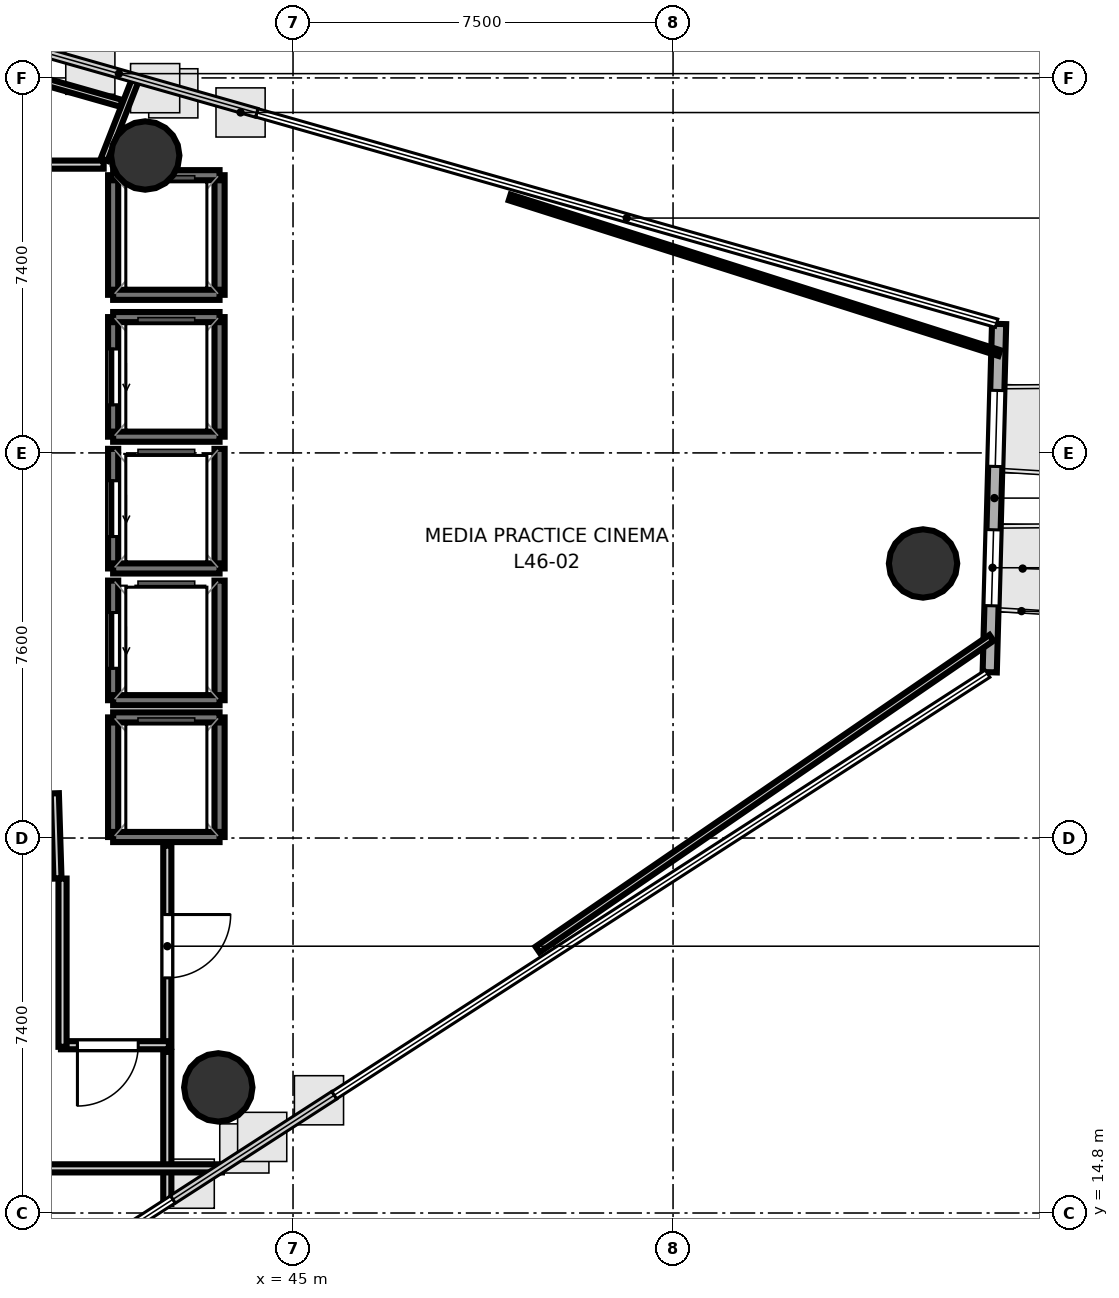
"""IFC4 building model, lengths in metres.
Left out: names, types, materials, properties, quantities, classifications, styles, units other than length and angle.
Written with IfcOpenShell. Run it as: python <this file> out.ifc"""

import sys

from ifc_helpers import new_model, si_unit, direction, frame, frame_2d, origin, origin_2d, place, context, subcontext, project, spatial, rectangle, hollow_circle, extrude, element, fill, save


model = new_model("IFC4")
c1 = context("Model", 3, precision=1e-05, world=origin(), true_north=direction((0.0, 1.0)))
c2 = subcontext(c1, "Body", "Model", "MODEL_VIEW")
j1 = project(units=[si_unit("LENGTHUNIT", "METRE"), si_unit("PLANEANGLEUNIT", "RADIAN")], contexts=[c1])
p1 = place(None, origin())
s1 = spatial("IfcSite", under=j1, at=p1, CompositionType="ELEMENT")
p2 = place(p1, origin())
s2 = spatial("IfcBuilding", under=s1, at=p2, CompositionType="ELEMENT")
p3 = place(p2, frame((0.0, 0.0, 180.9)))
s3 = spatial("IfcBuildingStorey", under=s2, at=p3, CompositionType="ELEMENT", Elevation=180.9)
for number, where, z_axis, x_axis in (
    (1, (57.434, 27.618, 0.0), (0.0, 0.0, 1.0), (1.0, 0.0, 0.0)),
    (2, (42.083, 35.669, 0.0), (0.0, 0.0, 1.0), (1.0, 0.0, 0.0)),
    (3, (43.525, 17.279, 0.0), (0.0, 0.0, 1.0), (1.0, 0.0, 0.0)),
):
    element("IfcColumn", number, at=place(p3, frame(where, z_axis=z_axis, x_axis=x_axis)), inside=s3, PredefinedType="COLUMN", context=c2, shape_type="SweptSolid", body=[
        extrude(hollow_circle(Radius=0.675, WallThickness=0.032, at=origin_2d()), origin(), (0.0, 0.0, 1.0), 3.7),
    ])
p4 = place(p3, frame((58.75, 25.471, 0.0), z_axis=(0.0, 0.0, 1.0), x_axis=(0.026948121349, 0.999636833433, 0.0)))
e4 = element("IfcWall", 4, at=p4, inside=s3, PredefinedType="SOLIDWALL", context=c2, shape_type="SweptSolid", body=[
    extrude(rectangle(XDim=6.876, YDim=0.28, at=frame_2d((3.438, 0.0))), origin(), (0.0, 0.0, 1.0), 3.4),
])
p5 = place(p4, frame((1.313, 0.0, 0.85)))
e5 = element("IfcOpeningElement", 5, at=p5, cuts=e4, PredefinedType="OPENING", context=c2, shape_type="SweptSolid", body=[
    extrude(rectangle(XDim=1.5, YDim=2.1, at=frame_2d((0.75, 1.05))), frame((0.0, 0.15, 0.0), z_axis=(0.0, -1.0, 0.0), x_axis=(1.0, 0.0, 0.0)), (0.0, 0.0, 1.0), 0.3),
])
p6 = place(p4, frame((4.063, 0.0, 0.85)))
e6 = element("IfcOpeningElement", 6, at=p6, cuts=e4, PredefinedType="OPENING", context=c2, shape_type="SweptSolid", body=[
    extrude(rectangle(XDim=1.5, YDim=2.1, at=frame_2d((0.75, 1.05))), frame((0.0, 0.15, 0.0), z_axis=(0.0, -1.0, 0.0), x_axis=(1.0, 0.0, 0.0)), (0.0, 0.0, 1.0), 0.3),
])
p7 = place(p3, frame((43.55, 30.12, 0.0), z_axis=(0.0, 0.0, 1.0), x_axis=(0.0, 1.0, 0.0)))
e7 = element("IfcWall", 7, at=p7, inside=s3, PredefinedType="SOLIDWALL", context=c2, shape_type="SweptSolid", body=[
    extrude(rectangle(XDim=2.36, YDim=0.2, at=frame_2d((1.18, 0.0))), origin(), (0.0, 0.0, 1.0), 3.4),
])
p8 = place(p3, frame((41.45, 30.12, 0.0), z_axis=(0.0, 0.0, 1.0), x_axis=(0.0, 1.0, 0.0)))
e8 = element("IfcWall", 8, at=p8, inside=s3, PredefinedType="SOLIDWALL", context=c2, shape_type="SweptSolid", body=[
    extrude(rectangle(XDim=2.36, YDim=0.2, at=frame_2d((1.18, 0.0))), origin(), (0.0, 0.0, 1.0), 3.4),
])
p9 = place(p8, frame((0.63, 0.0, 0.0)))
e9 = element("IfcOpeningElement", 9, at=p9, cuts=e8, PredefinedType="OPENING", context=c2, shape_type="SweptSolid", body=[
    extrude(rectangle(XDim=1.1, YDim=2.15, at=frame_2d((0.55, 1.075))), frame((0.0, 0.11, 0.0), z_axis=(0.0, -1.0, 0.0), x_axis=(1.0, 0.0, 0.0)), (0.0, 0.0, 1.0), 0.22),
])
for number, where, z_axis, x_axis in (
    (10, (41.45, 32.48, 0.0), (0.0, 0.0, 1.0), (1.0, 0.0, 0.0)),
    (11, (41.45, 30.12, 0.0), (0.0, 0.0, 1.0), (1.0, 0.0, 0.0)),
):
    element("IfcWall", number, at=place(p3, frame(where, z_axis=z_axis, x_axis=x_axis)), inside=s3, PredefinedType="SOLIDWALL", context=c2, shape_type="SweptSolid", body=[
        extrude(rectangle(XDim=2.1, YDim=0.2, at=frame_2d((1.05, 0.0))), origin(), (0.0, 0.0, 1.0), 3.4),
    ])
p10 = place(p3, frame((43.55, 27.52, 0.0), z_axis=(0.0, 0.0, 1.0), x_axis=(0.0, 1.0, 0.0)))
e12 = element("IfcWall", 12, at=p10, inside=s3, PredefinedType="SOLIDWALL", context=c2, shape_type="SweptSolid", body=[
    extrude(rectangle(XDim=2.36, YDim=0.2, at=frame_2d((1.18, 0.0))), origin(), (0.0, 0.0, 1.0), 3.4),
])
p11 = place(p3, frame((41.45, 27.52, 0.0), z_axis=(0.0, 0.0, 1.0), x_axis=(0.0, 1.0, 0.0)))
e13 = element("IfcWall", 13, at=p11, inside=s3, PredefinedType="SOLIDWALL", context=c2, shape_type="SweptSolid", body=[
    extrude(rectangle(XDim=2.36, YDim=0.2, at=frame_2d((1.18, 0.0))), origin(), (0.0, 0.0, 1.0), 3.4),
])
p12 = place(p11, frame((0.63, 0.0, 0.0)))
e14 = element("IfcOpeningElement", 14, at=p12, cuts=e13, PredefinedType="OPENING", context=c2, shape_type="SweptSolid", body=[
    extrude(rectangle(XDim=1.1, YDim=2.15, at=frame_2d((0.55, 1.075))), frame((0.0, 0.11, 0.0), z_axis=(0.0, -1.0, 0.0), x_axis=(1.0, 0.0, 0.0)), (0.0, 0.0, 1.0), 0.22),
])
p13 = place(p3, frame((41.45, 27.52, 0.0), z_axis=(0.0, 0.0, 1.0), x_axis=(1.0, 0.0, 0.0)))
e15 = element("IfcWall", 15, at=p13, inside=s3, PredefinedType="SOLIDWALL", context=c2, shape_type="SweptSolid", body=[
    extrude(rectangle(XDim=2.1, YDim=0.2, at=frame_2d((1.05, 0.0))), origin(), (0.0, 0.0, 1.0), 3.4),
])
p14 = place(p3, frame((43.55, 24.92, 0.0), z_axis=(0.0, 0.0, 1.0), x_axis=(0.0, 1.0, 0.0)))
e16 = element("IfcWall", 16, at=p14, inside=s3, PredefinedType="SOLIDWALL", context=c2, shape_type="SweptSolid", body=[
    extrude(rectangle(XDim=2.36, YDim=0.2, at=frame_2d((1.18, 0.0))), origin(), (0.0, 0.0, 1.0), 3.4),
])
p15 = place(p3, frame((41.45, 24.92, 0.0), z_axis=(0.0, 0.0, 1.0), x_axis=(0.0, 1.0, 0.0)))
e17 = element("IfcWall", 17, at=p15, inside=s3, PredefinedType="SOLIDWALL", context=c2, shape_type="SweptSolid", body=[
    extrude(rectangle(XDim=2.36, YDim=0.2, at=frame_2d((1.18, 0.0))), origin(), (0.0, 0.0, 1.0), 3.4),
])
p16 = place(p15, frame((0.63, 0.0, 0.0)))
e18 = element("IfcOpeningElement", 18, at=p16, cuts=e17, PredefinedType="OPENING", context=c2, shape_type="SweptSolid", body=[
    extrude(rectangle(XDim=1.1, YDim=2.15, at=frame_2d((0.55, 1.075))), frame((0.0, 0.11, 0.0), z_axis=(0.0, -1.0, 0.0), x_axis=(1.0, 0.0, 0.0)), (0.0, 0.0, 1.0), 0.22),
])
p17 = place(p3, frame((41.45, 24.92, 0.0), z_axis=(0.0, 0.0, 1.0), x_axis=(1.0, 0.0, 0.0)))
e19 = element("IfcWall", 19, at=p17, inside=s3, PredefinedType="SOLIDWALL", context=c2, shape_type="SweptSolid", body=[
    extrude(rectangle(XDim=2.1, YDim=0.2, at=frame_2d((1.05, 0.0))), origin(), (0.0, 0.0, 1.0), 3.4),
])
for number, where, z_axis, x_axis in (
    (20, (43.55, 22.22, 0.0), (0.0, 0.0, 1.0), (0.0, 1.0, 0.0)),
    (21, (41.45, 22.22, 0.0), (0.0, 0.0, 1.0), (0.0, 1.0, 0.0)),
):
    element("IfcWall", number, at=place(p3, frame(where, z_axis=z_axis, x_axis=x_axis)), inside=s3, PredefinedType="SOLIDWALL", context=c2, shape_type="SweptSolid", body=[
        extrude(rectangle(XDim=2.36, YDim=0.2, at=frame_2d((1.18, 0.0))), origin(), (0.0, 0.0, 1.0), 3.4),
    ])
for number, where, z_axis, x_axis in (
    (22, (41.45, 24.58, 0.0), (0.0, 0.0, 1.0), (1.0, 0.0, 0.0)),
    (23, (41.45, 22.22, 0.0), (0.0, 0.0, 1.0), (1.0, 0.0, 0.0)),
):
    element("IfcWall", number, at=place(p3, frame(where, z_axis=z_axis, x_axis=x_axis)), inside=s3, PredefinedType="SOLIDWALL", context=c2, shape_type="SweptSolid", body=[
        extrude(rectangle(XDim=2.1, YDim=0.2, at=frame_2d((1.05, 0.0))), origin(), (0.0, 0.0, 1.0), 3.4),
    ])
for number, where, z_axis, x_axis in (
    (24, (43.55, 32.92, 0.0), (0.0, 0.0, 1.0), (0.0, 1.0, 0.0)),
    (25, (41.45, 32.92, 0.0), (0.0, 0.0, 1.0), (0.0, 1.0, 0.0)),
):
    element("IfcWall", number, at=place(p3, frame(where, z_axis=z_axis, x_axis=x_axis)), inside=s3, PredefinedType="SOLIDWALL", context=c2, shape_type="SweptSolid", body=[
        extrude(rectangle(XDim=2.36, YDim=0.2, at=frame_2d((1.18, 0.0))), origin(), (0.0, 0.0, 1.0), 3.4),
    ])
for number, where, z_axis, x_axis in (
    (26, (41.45, 35.28, 0.0), (0.0, 0.0, 1.0), (1.0, 0.0, 0.0)),
    (27, (41.45, 32.92, 0.0), (0.0, 0.0, 1.0), (1.0, 0.0, 0.0)),
):
    element("IfcWall", number, at=place(p3, frame(where, z_axis=z_axis, x_axis=x_axis)), inside=s3, PredefinedType="SOLIDWALL", context=c2, shape_type="SweptSolid", body=[
        extrude(rectangle(XDim=2.1, YDim=0.2, at=frame_2d((1.05, 0.0))), origin(), (0.0, 0.0, 1.0), 3.4),
    ])
p18 = place(p3, frame((40.351, 21.401, 0.0), z_axis=(0.0, 0.0, 1.0), x_axis=(-0.031058045979, 0.999517582527, 0.0)))
e28 = element("IfcWall", 28, at=p18, inside=s3, PredefinedType="PARTITIONING", context=c2, shape_type="SweptSolid", body=[
    extrude(rectangle(XDim=1.682, YDim=0.16, at=frame_2d((0.841, 0.0))), origin(), (0.0, 0.0, 1.0), 2.72),
])
p19 = place(p3, frame((39.88, 35.489, 0.0), z_axis=(0.0, 0.0, 1.0), x_axis=(1.0, 0.0, 0.0)))
e29 = element("IfcWall", 29, at=p19, inside=s3, PredefinedType="PARTITIONING", context=c2, shape_type="SweptSolid", body=[
    extrude(rectangle(XDim=1.383, YDim=0.16, at=frame_2d((0.691, 0.0))), origin(), (0.0, 0.0, 1.0), 2.72),
])
p20 = place(p3, frame((42.519, 22.05, 0.0), z_axis=(0.0, 0.0, 1.0), x_axis=(0.0, -1.0, 0.0)))
e30 = element("IfcWall", 30, at=p20, inside=s3, PredefinedType="PARTITIONING", context=c2, shape_type="SweptSolid", body=[
    extrude(rectangle(XDim=3.97, YDim=0.16, at=frame_2d((1.985, 0.0))), origin(), (0.0, 0.0, 1.0), 2.72),
])
p21 = place(p20, frame((1.36, 0.0, 0.0)))
e31 = element("IfcOpeningElement", 31, at=p21, cuts=e30, PredefinedType="OPENING", context=c2, shape_type="SweptSolid", body=[
    extrude(rectangle(XDim=1.25, YDim=2.2, at=frame_2d((0.625, 1.1))), frame((0.0, 0.09, 0.0), z_axis=(0.0, -1.0, 0.0), x_axis=(1.0, 0.0, 0.0)), (0.0, 0.0, 1.0), 0.18),
])
p22 = place(p3, frame((42.55, 18.111, 0.0), z_axis=(0.0, 0.0, 1.0), x_axis=(-1.0, 0.0, 0.0)))
e32 = element("IfcWall", 32, at=p22, inside=s3, PredefinedType="PARTITIONING", context=c2, shape_type="SweptSolid", body=[
    extrude(rectangle(XDim=2.13, YDim=0.16, at=frame_2d((1.065, 0.0))), origin(), (0.0, 0.0, 1.0), 2.72),
])
p23 = place(p22, frame((0.605, 0.0, 0.0)))
e33 = element("IfcOpeningElement", 33, at=p23, cuts=e32, PredefinedType="OPENING", context=c2, shape_type="SweptSolid", body=[
    extrude(rectangle(XDim=1.2, YDim=2.15, at=frame_2d((0.6, 1.075))), frame((0.0, 0.09, 0.0), z_axis=(0.0, -1.0, 0.0), x_axis=(1.0, 0.0, 0.0)), (0.0, 0.0, 1.0), 0.18),
])
p24 = place(p3, frame((40.451, 18.08, 0.0), z_axis=(0.0, 0.0, 1.0), x_axis=(0.0, 1.0, 0.0)))
e34 = element("IfcWall", 34, at=p24, inside=s3, PredefinedType="PARTITIONING", context=c2, shape_type="SweptSolid", body=[
    extrude(rectangle(XDim=3.32, YDim=0.16, at=frame_2d((1.66, 0.0))), origin(), (0.0, 0.0, 1.0), 2.72),
])
p25 = place(p3, frame((42.519, 17.98, 0.0), z_axis=(0.0, 0.0, 1.0), x_axis=(0.0, -1.0, 0.0)))
e35 = element("IfcWall", 35, at=p25, inside=s3, PredefinedType="PARTITIONING", context=c2, shape_type="SweptSolid", body=[
    extrude(rectangle(XDim=3.002, YDim=0.16, at=frame_2d((1.501, 0.0))), origin(), (0.0, 0.0, 1.0), 2.72),
])
p26 = place(p3, frame((43.597, 15.681, 0.0), z_axis=(0.0, 0.0, 1.0), x_axis=(-1.0, 0.0, 0.0)))
e36 = element("IfcWall", 36, at=p26, inside=s3, PredefinedType="PARTITIONING", context=c2, shape_type="SweptSolid", body=[
    extrude(rectangle(XDim=15.197, YDim=0.16, at=frame_2d((7.599, 0.0))), origin(), (0.0, 0.0, 1.0), 2.72),
])
p27 = place(p26, frame((7.179, 0.0, 0.0)))
e37 = element("IfcOpeningElement", 37, at=p27, cuts=e36, PredefinedType="OPENING", context=c2, shape_type="SweptSolid", body=[
    extrude(rectangle(XDim=1.25, YDim=2.2, at=frame_2d((0.625, 1.1))), frame((0.0, 0.09, 0.0), z_axis=(0.0, -1.0, 0.0), x_axis=(1.0, 0.0, 0.0)), (0.0, 0.0, 1.0), 0.18),
])
p28 = place(p3, frame((41.273, 35.589, 0.0), z_axis=(0.0, 0.0, 1.0), x_axis=(0.364552894348, 0.931182681981, 0.0)))
e38 = element("IfcWall", 38, at=p28, inside=s3, PredefinedType="PARTITIONING", context=c2, shape_type="SweptSolid", body=[
    extrude(rectangle(XDim=1.739, YDim=0.14, at=frame_2d((0.869, 0.0))), origin(), (0.0, 0.0, 1.0), 2.72),
])
p29 = place(p3, frame((49.276, 34.842, 0.0), z_axis=(0.0, 0.0, 1.0), x_axis=(0.953025342731, -0.302890567882, 0.0)))
e39 = element("IfcWall", 39, at=p29, inside=s3, PredefinedType="PARTITIONING", context=c2, shape_type="SweptSolid", body=[
    extrude(rectangle(XDim=10.139, YDim=0.12, at=frame_2d((5.07, 0.0))), origin(), (0.0, 0.0, 1.0), 2.72),
])
p30 = place(p3, frame((58.784, 26.15, 0.0), z_axis=(0.0, 0.0, 1.0), x_axis=(-0.824381998841, -0.566033850566, 0.0)))
e40 = element("IfcWall", 40, at=p30, inside=s3, PredefinedType="PARTITIONING", context=c2, shape_type="SweptSolid", body=[
    extrude(rectangle(XDim=10.867, YDim=0.14, at=frame_2d((5.433, 0.0))), origin(), (0.0, 0.0, 1.0), 2.72),
])
p31 = place(p3, frame((37.221, 37.946, 0.0), z_axis=(0.0, 0.0, 1.0), x_axis=(0.961870441874, -0.27350548998, 0.0)))
e41 = element("IfcWall", 41, at=p31, inside=s3, PredefinedType="PARTITIONING", context=c2, shape_type="SweptSolid", body=[
    extrude(rectangle(XDim=4.563, YDim=0.14, at=frame_2d((2.282, 0.0))), origin(), (0.0, 0.0, 1.0), 2.72),
])
p32 = place(p9, origin())
e42 = element("IfcDoor", 42, at=p32, inside=s3, OperationType="SLIDING_TO_LEFT", PredefinedType="DOOR", context=c2, shape_type="SweptSolid", body=[
    extrude(rectangle(XDim=1.1, YDim=2.15, at=frame_2d((0.55, 1.075))), frame((0.0, 0.025, 0.0), z_axis=(0.0, -1.0, 0.0), x_axis=(1.0, 0.0, 0.0)), (0.0, 0.0, 1.0), 0.05),
])
fill(e9, e42)
p33 = place(p12, origin())
e43 = element("IfcDoor", 43, at=p33, inside=s3, OperationType="SLIDING_TO_LEFT", PredefinedType="DOOR", context=c2, shape_type="SweptSolid", body=[
    extrude(rectangle(XDim=1.1, YDim=2.15, at=frame_2d((0.55, 1.075))), frame((0.0, 0.025, 0.0), z_axis=(0.0, -1.0, 0.0), x_axis=(1.0, 0.0, 0.0)), (0.0, 0.0, 1.0), 0.05),
])
fill(e14, e43)
p34 = place(p16, origin())
e44 = element("IfcDoor", 44, at=p34, inside=s3, OperationType="SLIDING_TO_LEFT", PredefinedType="DOOR", context=c2, shape_type="SweptSolid", body=[
    extrude(rectangle(XDim=1.1, YDim=2.15, at=frame_2d((0.55, 1.075))), frame((0.0, 0.025, 0.0), z_axis=(0.0, -1.0, 0.0), x_axis=(1.0, 0.0, 0.0)), (0.0, 0.0, 1.0), 0.05),
])
fill(e18, e44)
p35 = place(p23, origin())
e45 = element("IfcDoor", 45, at=p35, inside=s3, OperationType="SINGLE_SWING_RIGHT", PredefinedType="DOOR", context=c2, shape_type="SweptSolid", body=[
    extrude(rectangle(XDim=1.2, YDim=2.15, at=frame_2d((0.6, 1.075))), frame((0.0, 0.025, 0.0), z_axis=(0.0, -1.0, 0.0), x_axis=(1.0, 0.0, 0.0)), (0.0, 0.0, 1.0), 0.05),
])
fill(e33, e45)
p36 = place(p21, origin())
e46 = element("IfcDoor", 46, at=p36, inside=s3, OperationType="SINGLE_SWING_LEFT", PredefinedType="DOOR", context=c2, shape_type="SweptSolid", body=[
    extrude(rectangle(XDim=1.25, YDim=2.2, at=frame_2d((0.625, 1.1))), frame((0.0, 0.025, 0.0), z_axis=(0.0, -1.0, 0.0), x_axis=(1.0, 0.0, 0.0)), (0.0, 0.0, 1.0), 0.05),
])
fill(e31, e46)
p37 = place(p5, origin())
e47 = element("IfcWindow", 47, at=p37, inside=s3, PartitioningType="SINGLE_PANEL", PredefinedType="WINDOW", context=c2, shape_type="SweptSolid", body=[
    extrude(rectangle(XDim=1.5, YDim=2.1, at=frame_2d((0.75, 1.05))), frame((0.0, 0.03, 0.0), z_axis=(0.0, -1.0, 0.0), x_axis=(1.0, 0.0, 0.0)), (0.0, 0.0, 1.0), 0.06),
])
fill(e5, e47)
p38 = place(p6, origin())
e48 = element("IfcWindow", 48, at=p38, inside=s3, PartitioningType="SINGLE_PANEL", PredefinedType="WINDOW", context=c2, shape_type="SweptSolid", body=[
    extrude(rectangle(XDim=1.5, YDim=2.1, at=frame_2d((0.75, 1.05))), frame((0.0, 0.03, 0.0), z_axis=(0.0, -1.0, 0.0), x_axis=(1.0, 0.0, 0.0)), (0.0, 0.0, 1.0), 0.06),
])
fill(e6, e48)
save(model, sys.argv[1])
